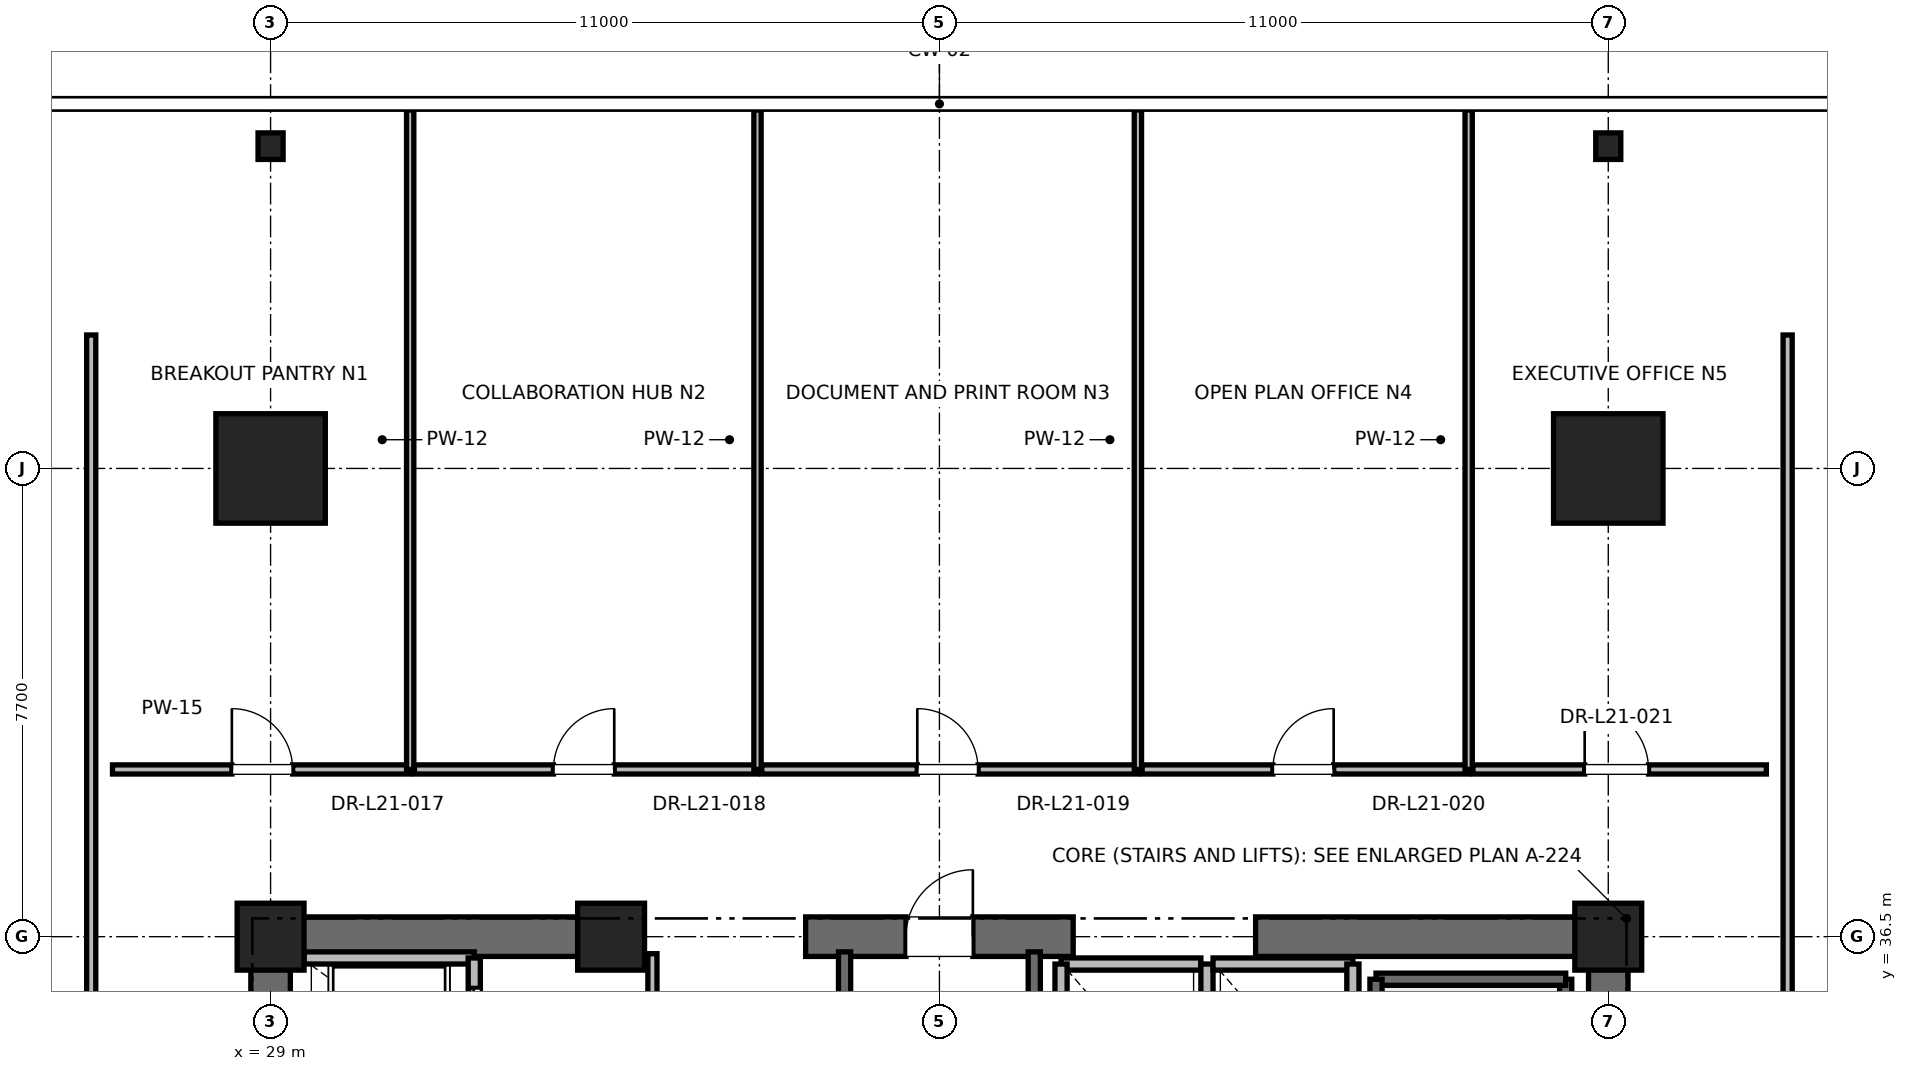
"""IFC4 building model, lengths in metres.
Left out: names, types, materials, properties, quantities, classifications, styles, units other than length and angle.
Written with IfcOpenShell. Run it as: python <this file> out.ifc"""

import sys

from ifc_helpers import new_model, si_unit, direction, frame, frame_2d, origin, origin_2d, place, context, subcontext, project, spatial, rectangle, i_section, extrude, element, fill, save


model = new_model("IFC4")
c1 = context("Model", 3, precision=1e-05, world=origin(), true_north=direction((0.0, 1.0)))
c2 = subcontext(c1, "Body", "Model", "MODEL_VIEW")
j1 = project(units=[si_unit("LENGTHUNIT", "METRE"), si_unit("PLANEANGLEUNIT", "RADIAN")], contexts=[c1])
p1 = place(None, origin())
s1 = spatial("IfcSite", under=j1, at=p1, CompositionType="ELEMENT")
p2 = place(p1, origin())
s2 = spatial("IfcBuilding", under=s1, at=p2, CompositionType="ELEMENT")
p3 = place(p2, frame((0.0, 0.0, 91.6)))
s3 = spatial("IfcBuildingStorey", under=s2, at=p3, CompositionType="ELEMENT", Elevation=91.6)
for number, where, z_axis, x_axis in (
    (1, (29.0, 44.2, 0.0), (0.0, 0.0, 1.0), (1.0, 0.0, 0.0)),
    (2, (51.0, 44.2, 0.0), (0.0, 0.0, 1.0), (1.0, 0.0, 0.0)),
):
    element("IfcColumn", number, at=place(p3, frame(where, z_axis=z_axis, x_axis=x_axis)), inside=s3, PredefinedType="COLUMN", context=c2, shape_type="SweptSolid", body=[
        extrude(rectangle(XDim=1.8, YDim=1.8, at=origin_2d()), origin(), (0.0, 0.0, 1.0), 4.0),
    ])
for number, where, z_axis, x_axis in (
    (3, (29.0, 49.5, 0.0), (0.0, 0.0, 1.0), (1.0, 0.0, 0.0)),
    (4, (51.0, 49.5, 0.0), (0.0, 0.0, 1.0), (1.0, 0.0, 0.0)),
):
    element("IfcColumn", number, at=place(p3, frame(where, z_axis=z_axis, x_axis=x_axis)), inside=s3, PredefinedType="COLUMN", context=c2, shape_type="SweptSolid", body=[
        extrude(i_section(OverallWidth=0.412, OverallDepth=0.437, WebThickness=0.036, FlangeThickness=0.058, FilletRadius=0.015, at=origin_2d()), origin(), (0.0, 0.0, 1.0), 4.0),
    ])
for number, where, z_axis, x_axis in (
    (5, (29.0, 36.5, 0.0), (0.0, 0.0, 1.0), (1.0, 0.0, 0.0)),
    (6, (51.0, 36.5, 0.0), (0.0, 0.0, 1.0), (1.0, 0.0, 0.0)),
    (7, (34.6, 36.5, 0.0), (0.0, 0.0, 1.0), (1.0, 0.0, 0.0)),
):
    element("IfcColumn", number, at=place(p3, frame(where, z_axis=z_axis, x_axis=x_axis)), inside=s3, PredefinedType="PILASTER", context=c2, shape_type="SweptSolid", body=[
        extrude(rectangle(XDim=1.1, YDim=1.1, at=origin_2d()), origin(), (0.0, 0.0, 1.0), 4.0),
    ])
p4 = place(p3, frame((29.0, 36.5, 0.0), z_axis=(0.0, 0.0, 1.0), x_axis=(1.0, 0.0, 0.0)))
e8 = element("IfcWall", 8, at=p4, inside=s3, PredefinedType="SHEAR", context=c2, shape_type="SweptSolid", body=[
    extrude(rectangle(XDim=5.8, YDim=0.65, at=frame_2d((2.9, 0.0))), origin(), (0.0, 0.0, 1.0), 3.76),
])
p5 = place(p3, frame((37.8, 36.5, 0.0), z_axis=(0.0, 0.0, 1.0), x_axis=(1.0, 0.0, 0.0)))
e9 = element("IfcWall", 9, at=p5, inside=s3, PredefinedType="SHEAR", context=c2, shape_type="SweptSolid", body=[
    extrude(rectangle(XDim=4.4, YDim=0.65, at=frame_2d((2.2, 0.0))), origin(), (0.0, 0.0, 1.0), 3.76),
])
p6 = place(p5, frame((1.65, 0.0, 0.0)))
e10 = element("IfcOpeningElement", 10, at=p6, cuts=e9, PredefinedType="OPENING", context=c2, shape_type="SweptSolid", body=[
    extrude(rectangle(XDim=1.1, YDim=2.15, at=frame_2d((0.55, 1.075))), frame((0.0, 0.325, 0.0), z_axis=(0.0, -1.0, 0.0), x_axis=(1.0, 0.0, 0.0)), (0.0, 0.0, 1.0), 0.65),
])
for number, where, z_axis, x_axis in (
    (11, (45.2, 36.5, 0.0), (0.0, 0.0, 1.0), (1.0, 0.0, 0.0)),
    (12, (29.0, 30.7, 0.0), (0.0, 0.0, 1.0), (0.0, 1.0, 0.0)),
):
    element("IfcWall", number, at=place(p3, frame(where, z_axis=z_axis, x_axis=x_axis)), inside=s3, PredefinedType="SHEAR", context=c2, shape_type="SweptSolid", body=[
        extrude(rectangle(XDim=5.8, YDim=0.65, at=frame_2d((2.9, 0.0))), origin(), (0.0, 0.0, 1.0), 3.76),
    ])
p7 = place(p3, frame((51.0, 27.7, 0.0), z_axis=(0.0, 0.0, 1.0), x_axis=(0.0, 1.0, 0.0)))
e13 = element("IfcWall", 13, at=p7, inside=s3, PredefinedType="SHEAR", context=c2, shape_type="SweptSolid", body=[
    extrude(rectangle(XDim=8.8, YDim=0.65, at=frame_2d((4.4, 0.0))), origin(), (0.0, 0.0, 1.0), 3.76),
])
p8 = place(p3, frame((50.3, 27.65, 0.0), z_axis=(0.0, 0.0, 1.0), x_axis=(0.0, 1.0, 0.0)))
e14 = element("IfcWall", 14, at=p8, inside=s3, PredefinedType="SOLIDWALL", context=c2, shape_type="SweptSolid", body=[
    extrude(rectangle(XDim=8.15, YDim=0.2, at=frame_2d((4.075, 0.0))), origin(), (0.0, 0.0, 1.0), 3.76),
])
p9 = place(p3, frame((47.18, 35.8, 0.0), z_axis=(0.0, 0.0, 1.0), x_axis=(1.0, 0.0, 0.0)))
e15 = element("IfcWall", 15, at=p9, inside=s3, PredefinedType="SOLIDWALL", context=c2, shape_type="SweptSolid", body=[
    extrude(rectangle(XDim=3.12, YDim=0.2, at=frame_2d((1.56, 0.0))), origin(), (0.0, 0.0, 1.0), 3.76),
])
p10 = place(p3, frame((47.18, 27.62, 0.0), z_axis=(0.0, 0.0, 1.0), x_axis=(0.0, 1.0, 0.0)))
e16 = element("IfcWall", 16, at=p10, inside=s3, PredefinedType="SOLIDWALL", context=c2, shape_type="SweptSolid", body=[
    extrude(rectangle(XDim=8.18, YDim=0.2, at=frame_2d((4.09, 0.0))), origin(), (0.0, 0.0, 1.0), 3.76),
])
p11 = place(p3, frame((38.44, 27.38, 0.0), z_axis=(0.0, 0.0, 1.0), x_axis=(0.0, 1.0, 0.0)))
e17 = element("IfcWall", 17, at=p11, inside=s3, PredefinedType="SOLIDWALL", context=c2, shape_type="SweptSolid", body=[
    extrude(rectangle(XDim=8.87, YDim=0.2, at=frame_2d((4.435, 0.0))), origin(), (0.0, 0.0, 1.0), 3.76),
])
p12 = place(p3, frame((41.56, 27.68, 0.0), z_axis=(0.0, 0.0, 1.0), x_axis=(0.0, 1.0, 0.0)))
e18 = element("IfcWall", 18, at=p12, inside=s3, PredefinedType="SOLIDWALL", context=c2, shape_type="SweptSolid", body=[
    extrude(rectangle(XDim=8.57, YDim=0.2, at=frame_2d((4.285, 0.0))), origin(), (0.0, 0.0, 1.0), 3.76),
])
p13 = place(p3, frame((32.35, 36.15, 0.0), z_axis=(0.0, 0.0, 1.0), x_axis=(-1.0, 0.0, 0.0)))
e19 = element("IfcWall", 19, at=p13, inside=s3, PredefinedType="SOLIDWALL", context=c2, shape_type="SweptSolid", body=[
    extrude(rectangle(XDim=2.8, YDim=0.2, at=frame_2d((1.4, 0.0))), origin(), (0.0, 0.0, 1.0), 2.889),
])
p14 = place(p3, frame((32.35, 34.05, 0.0), z_axis=(0.0, 0.0, 1.0), x_axis=(0.0, 1.0, 0.0)))
e20 = element("IfcWall", 20, at=p14, inside=s3, PredefinedType="SOLIDWALL", context=c2, shape_type="SweptSolid", body=[
    extrude(rectangle(XDim=2.1, YDim=0.2, at=frame_2d((1.05, 0.0))), origin(), (0.0, 0.0, 1.0), 3.76),
])
p15 = place(p14, frame((0.5, 0.0, 0.0)))
e21 = element("IfcOpeningElement", 21, at=p15, cuts=e20, PredefinedType="OPENING", context=c2, shape_type="SweptSolid", body=[
    extrude(rectangle(XDim=1.1, YDim=2.2, at=frame_2d((0.55, 1.1))), frame((0.0, 0.1, 0.0), z_axis=(0.0, -1.0, 0.0), x_axis=(1.0, 0.0, 0.0)), (0.0, 0.0, 1.0), 0.2),
])
p16 = place(p3, frame((44.3, 36.05, 0.0), z_axis=(0.0, 0.0, 1.0), x_axis=(-1.0, 0.0, 0.0)))
e22 = element("IfcWall", 22, at=p16, inside=s3, PredefinedType="SOLIDWALL", context=c2, shape_type="SweptSolid", body=[
    extrude(rectangle(XDim=2.3, YDim=0.2, at=frame_2d((1.15, 0.0))), origin(), (0.0, 0.0, 1.0), 2.54),
])
for number, where, z_axis, x_axis in (
    (23, (42.0, 36.05, 0.0), (0.0, 0.0, 1.0), (0.0, -1.0, 0.0)),
    (24, (44.4, 33.45, 0.0), (0.0, 0.0, 1.0), (0.0, 1.0, 0.0)),
):
    element("IfcWall", number, at=place(p3, frame(where, z_axis=z_axis, x_axis=x_axis)), inside=s3, PredefinedType="SOLIDWALL", context=c2, shape_type="SweptSolid", body=[
        extrude(rectangle(XDim=2.6, YDim=0.2, at=frame_2d((1.3, 0.0))), origin(), (0.0, 0.0, 1.0), 2.54),
    ])
p17 = place(p3, frame((46.8, 36.05, 0.0), z_axis=(0.0, 0.0, 1.0), x_axis=(-1.0, 0.0, 0.0)))
e25 = element("IfcWall", 25, at=p17, inside=s3, PredefinedType="SOLIDWALL", context=c2, shape_type="SweptSolid", body=[
    extrude(rectangle(XDim=2.3, YDim=0.2, at=frame_2d((1.15, 0.0))), origin(), (0.0, 0.0, 1.0), 2.54),
])
p18 = place(p3, frame((46.8, 33.45, 0.0), z_axis=(0.0, 0.0, 1.0), x_axis=(0.0, 1.0, 0.0)))
e26 = element("IfcWall", 26, at=p18, inside=s3, PredefinedType="SOLIDWALL", context=c2, shape_type="SweptSolid", body=[
    extrude(rectangle(XDim=2.6, YDim=0.2, at=frame_2d((1.3, 0.0))), origin(), (0.0, 0.0, 1.0), 3.76),
])
p19 = place(p3, frame((35.28, 33.95, 0.0), z_axis=(0.0, 0.0, 1.0), x_axis=(0.0, 1.0, 0.0)))
e27 = element("IfcWall", 27, at=p19, inside=s3, PredefinedType="PARTITIONING", context=c2, shape_type="SweptSolid", body=[
    extrude(rectangle(XDim=2.27, YDim=0.15, at=frame_2d((1.135, 0.0))), origin(), (0.0, 0.0, 1.0), 2.54),
])
p20 = place(p19, frame((0.66, 0.0, 0.0)))
e28 = element("IfcOpeningElement", 28, at=p20, cuts=e27, PredefinedType="OPENING", context=c2, shape_type="SweptSolid", body=[
    extrude(rectangle(XDim=0.95, YDim=2.15, at=frame_2d((0.475, 1.075))), frame((0.0, 0.075, 0.0), z_axis=(0.0, -1.0, 0.0), x_axis=(1.0, 0.0, 0.0)), (0.0, 0.0, 1.0), 0.15),
])
p21 = place(p3, frame((26.4, 39.25, 0.0), z_axis=(0.0, 0.0, 1.0), x_axis=(1.0, 0.0, 0.0)))
e29 = element("IfcWall", 29, at=p21, inside=s3, PredefinedType="PARTITIONING", context=c2, shape_type="SweptSolid", body=[
    extrude(rectangle(XDim=4.896, YDim=0.15, at=frame_2d((2.448, 0.0))), origin(), (0.0, 0.0, 1.0), 2.85),
])
p22 = place(p21, frame((1.963, 0.0, 0.0)))
e30 = element("IfcOpeningElement", 30, at=p22, cuts=e29, PredefinedType="OPENING", context=c2, shape_type="SweptSolid", body=[
    extrude(rectangle(XDim=1.0, YDim=2.15, at=frame_2d((0.5, 1.075))), frame((0.0, 0.075, 0.0), z_axis=(0.0, -1.0, 0.0), x_axis=(1.0, 0.0, 0.0)), (0.0, 0.0, 1.0), 0.15),
])
p23 = place(p3, frame((31.296, 39.25, 0.0), z_axis=(0.0, 0.0, 1.0), x_axis=(0.0, 1.0, 0.0)))
e31 = element("IfcWall", 31, at=p23, inside=s3, PredefinedType="PARTITIONING", context=c2, shape_type="SweptSolid", body=[
    extrude(rectangle(XDim=10.845, YDim=0.12, at=frame_2d((5.422, 0.0))), origin(), (0.0, 0.0, 1.0), 2.39),
])
p24 = place(p3, frame((31.366, 39.25, 0.0), z_axis=(0.0, 0.0, 1.0), x_axis=(1.0, 0.0, 0.0)))
e32 = element("IfcWall", 32, at=p24, inside=s3, PredefinedType="PARTITIONING", context=c2, shape_type="SweptSolid", body=[
    extrude(rectangle(XDim=5.642, YDim=0.15, at=frame_2d((2.821, 0.0))), origin(), (0.0, 0.0, 1.0), 2.85),
])
p25 = place(p24, frame((2.286, 0.0, 0.0)))
e33 = element("IfcOpeningElement", 33, at=p25, cuts=e32, PredefinedType="OPENING", context=c2, shape_type="SweptSolid", body=[
    extrude(rectangle(XDim=1.0, YDim=2.15, at=frame_2d((0.5, 1.075))), frame((0.0, 0.075, 0.0), z_axis=(0.0, -1.0, 0.0), x_axis=(1.0, 0.0, 0.0)), (0.0, 0.0, 1.0), 0.15),
])
p26 = place(p3, frame((37.008, 39.25, 0.0), z_axis=(0.0, 0.0, 1.0), x_axis=(0.0, 1.0, 0.0)))
e34 = element("IfcWall", 34, at=p26, inside=s3, PredefinedType="PARTITIONING", context=c2, shape_type="SweptSolid", body=[
    extrude(rectangle(XDim=10.845, YDim=0.12, at=frame_2d((5.422, 0.0))), origin(), (0.0, 0.0, 1.0), 2.39),
])
p27 = place(p3, frame((37.078, 39.25, 0.0), z_axis=(0.0, 0.0, 1.0), x_axis=(1.0, 0.0, 0.0)))
e35 = element("IfcWall", 35, at=p27, inside=s3, PredefinedType="PARTITIONING", context=c2, shape_type="SweptSolid", body=[
    extrude(rectangle(XDim=6.186, YDim=0.15, at=frame_2d((3.093, 0.0))), origin(), (0.0, 0.0, 1.0), 2.85),
])
p28 = place(p27, frame((2.558, 0.0, 0.0)))
e36 = element("IfcOpeningElement", 36, at=p28, cuts=e35, PredefinedType="OPENING", context=c2, shape_type="SweptSolid", body=[
    extrude(rectangle(XDim=1.0, YDim=2.15, at=frame_2d((0.5, 1.075))), frame((0.0, 0.075, 0.0), z_axis=(0.0, -1.0, 0.0), x_axis=(1.0, 0.0, 0.0)), (0.0, 0.0, 1.0), 0.15),
])
p29 = place(p3, frame((43.264, 39.25, 0.0), z_axis=(0.0, 0.0, 1.0), x_axis=(0.0, 1.0, 0.0)))
e37 = element("IfcWall", 37, at=p29, inside=s3, PredefinedType="PARTITIONING", context=c2, shape_type="SweptSolid", body=[
    extrude(rectangle(XDim=10.845, YDim=0.12, at=frame_2d((5.422, 0.0))), origin(), (0.0, 0.0, 1.0), 2.39),
])
p30 = place(p3, frame((43.334, 39.25, 0.0), z_axis=(0.0, 0.0, 1.0), x_axis=(1.0, 0.0, 0.0)))
e38 = element("IfcWall", 38, at=p30, inside=s3, PredefinedType="PARTITIONING", context=c2, shape_type="SweptSolid", body=[
    extrude(rectangle(XDim=5.37, YDim=0.15, at=frame_2d((2.685, 0.0))), origin(), (0.0, 0.0, 1.0), 2.85),
])
p31 = place(p30, frame((2.15, 0.0, 0.0)))
e39 = element("IfcOpeningElement", 39, at=p31, cuts=e38, PredefinedType="OPENING", context=c2, shape_type="SweptSolid", body=[
    extrude(rectangle(XDim=1.0, YDim=2.15, at=frame_2d((0.5, 1.075))), frame((0.0, 0.075, 0.0), z_axis=(0.0, -1.0, 0.0), x_axis=(1.0, 0.0, 0.0)), (0.0, 0.0, 1.0), 0.15),
])
p32 = place(p3, frame((48.704, 39.25, 0.0), z_axis=(0.0, 0.0, 1.0), x_axis=(0.0, 1.0, 0.0)))
e40 = element("IfcWall", 40, at=p32, inside=s3, PredefinedType="PARTITIONING", context=c2, shape_type="SweptSolid", body=[
    extrude(rectangle(XDim=10.845, YDim=0.12, at=frame_2d((5.422, 0.0))), origin(), (0.0, 0.0, 1.0), 2.39),
])
p33 = place(p3, frame((48.774, 39.25, 0.0), z_axis=(0.0, 0.0, 1.0), x_axis=(1.0, 0.0, 0.0)))
e41 = element("IfcWall", 41, at=p33, inside=s3, PredefinedType="PARTITIONING", context=c2, shape_type="SweptSolid", body=[
    extrude(rectangle(XDim=4.826, YDim=0.15, at=frame_2d((2.413, 0.0))), origin(), (0.0, 0.0, 1.0), 2.85),
])
p34 = place(p33, frame((1.838, 0.0, 0.0)))
e42 = element("IfcOpeningElement", 42, at=p34, cuts=e41, PredefinedType="OPENING", context=c2, shape_type="SweptSolid", body=[
    extrude(rectangle(XDim=1.05, YDim=2.2, at=frame_2d((0.525, 1.1))), frame((0.0, 0.075, 0.0), z_axis=(0.0, -1.0, 0.0), x_axis=(1.0, 0.0, 0.0)), (0.0, 0.0, 1.0), 0.15),
])
p35 = place(p3, frame((26.05, 24.547, 0.0), z_axis=(0.0, 0.0, 1.0), x_axis=(0.0, 1.0, 0.0)))
e43 = element("IfcWall", 43, at=p35, inside=s3, PredefinedType="PARTITIONING", context=c2, shape_type="SweptSolid", body=[
    extrude(rectangle(XDim=21.848, YDim=0.15, at=frame_2d((10.924, 0.0))), origin(), (0.0, 0.0, 1.0), 2.85),
])
p36 = place(p35, frame((5.427, 0.0, 0.0)))
e44 = element("IfcOpeningElement", 44, at=p36, cuts=e43, PredefinedType="OPENING", context=c2, shape_type="SweptSolid", body=[
    extrude(rectangle(XDim=1.0, YDim=2.15, at=frame_2d((0.5, 1.075))), frame((0.0, 0.075, 0.0), z_axis=(0.0, -1.0, 0.0), x_axis=(1.0, 0.0, 0.0)), (0.0, 0.0, 1.0), 0.15),
])
p37 = place(p3, frame((53.95, 30.593, 0.0), z_axis=(0.0, 0.0, 1.0), x_axis=(0.0, 1.0, 0.0)))
e45 = element("IfcWall", 45, at=p37, inside=s3, PredefinedType="PARTITIONING", context=c2, shape_type="SweptSolid", body=[
    extrude(rectangle(XDim=15.802, YDim=0.15, at=frame_2d((7.901, 0.0))), origin(), (0.0, 0.0, 1.0), 2.85),
])
p38 = place(p37, frame((2.403, 0.0, 0.0)))
e46 = element("IfcOpeningElement", 46, at=p38, cuts=e45, PredefinedType="OPENING", context=c2, shape_type="SweptSolid", body=[
    extrude(rectangle(XDim=1.0, YDim=2.15, at=frame_2d((0.5, 1.075))), frame((0.0, 0.075, 0.0), z_axis=(0.0, -1.0, 0.0), x_axis=(1.0, 0.0, 0.0)), (0.0, 0.0, 1.0), 0.15),
])
p39 = place(p6, origin())
e47 = element("IfcDoor", 47, at=p39, inside=s3, OperationType="SINGLE_SWING_RIGHT", PredefinedType="DOOR", context=c2, shape_type="SweptSolid", body=[
    extrude(rectangle(XDim=1.1, YDim=2.15, at=frame_2d((0.55, 1.075))), frame((0.0, 0.025, 0.0), z_axis=(0.0, -1.0, 0.0), x_axis=(1.0, 0.0, 0.0)), (0.0, 0.0, 1.0), 0.05),
])
fill(e10, e47)
p40 = place(p15, origin())
e48 = element("IfcDoor", 48, at=p40, inside=s3, OperationType="SLIDING_TO_RIGHT", PredefinedType="DOOR", context=c2, shape_type="SweptSolid", body=[
    extrude(rectangle(XDim=1.1, YDim=2.2, at=frame_2d((0.55, 1.1))), frame((0.0, 0.025, 0.0), z_axis=(0.0, -1.0, 0.0), x_axis=(1.0, 0.0, 0.0)), (0.0, 0.0, 1.0), 0.05),
])
fill(e21, e48)
p41 = place(p22, origin())
e49 = element("IfcDoor", 49, at=p41, inside=s3, OperationType="SINGLE_SWING_LEFT", PredefinedType="DOOR", context=c2, shape_type="SweptSolid", body=[
    extrude(rectangle(XDim=1.0, YDim=2.15, at=frame_2d((0.5, 1.075))), frame((0.0, 0.025, 0.0), z_axis=(0.0, -1.0, 0.0), x_axis=(1.0, 0.0, 0.0)), (0.0, 0.0, 1.0), 0.05),
])
fill(e30, e49)
p42 = place(p25, origin())
e50 = element("IfcDoor", 50, at=p42, inside=s3, OperationType="SINGLE_SWING_RIGHT", PredefinedType="DOOR", context=c2, shape_type="SweptSolid", body=[
    extrude(rectangle(XDim=1.0, YDim=2.15, at=frame_2d((0.5, 1.075))), frame((0.0, 0.025, 0.0), z_axis=(0.0, -1.0, 0.0), x_axis=(1.0, 0.0, 0.0)), (0.0, 0.0, 1.0), 0.05),
])
fill(e33, e50)
p43 = place(p28, origin())
e51 = element("IfcDoor", 51, at=p43, inside=s3, OperationType="SINGLE_SWING_LEFT", PredefinedType="DOOR", context=c2, shape_type="SweptSolid", body=[
    extrude(rectangle(XDim=1.0, YDim=2.15, at=frame_2d((0.5, 1.075))), frame((0.0, 0.025, 0.0), z_axis=(0.0, -1.0, 0.0), x_axis=(1.0, 0.0, 0.0)), (0.0, 0.0, 1.0), 0.05),
])
fill(e36, e51)
p44 = place(p31, origin())
e52 = element("IfcDoor", 52, at=p44, inside=s3, OperationType="SINGLE_SWING_RIGHT", PredefinedType="DOOR", context=c2, shape_type="SweptSolid", body=[
    extrude(rectangle(XDim=1.0, YDim=2.15, at=frame_2d((0.5, 1.075))), frame((0.0, 0.025, 0.0), z_axis=(0.0, -1.0, 0.0), x_axis=(1.0, 0.0, 0.0)), (0.0, 0.0, 1.0), 0.05),
])
fill(e39, e52)
p45 = place(p34, origin())
e53 = element("IfcDoor", 53, at=p45, inside=s3, OperationType="SINGLE_SWING_LEFT", PredefinedType="DOOR", context=c2, shape_type="SweptSolid", body=[
    extrude(rectangle(XDim=1.05, YDim=2.2, at=frame_2d((0.525, 1.1))), frame((0.0, 0.025, 0.0), z_axis=(0.0, -1.0, 0.0), x_axis=(1.0, 0.0, 0.0)), (0.0, 0.0, 1.0), 0.05),
])
fill(e42, e53)
save(model, sys.argv[1])
